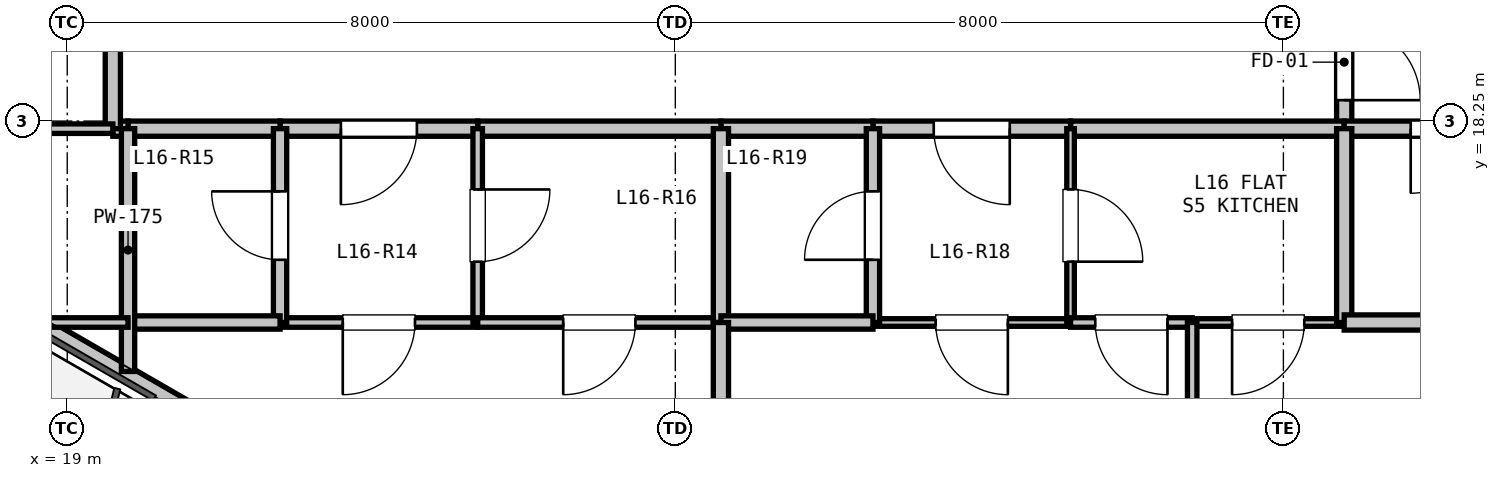
"""IFC4 building model, lengths in metres.
Left out: names, types, materials, properties, quantities, classifications, styles, units other than length and angle.
Written with IfcOpenShell. Run it as: python <this file> out.ifc"""

import sys

from ifc_helpers import new_model, si_unit, direction, frame, frame_2d, origin, place, context, subcontext, project, spatial, rectangle, extrude, element, fill, save


model = new_model("IFC4")
c1 = context("Model", 3, precision=1e-05, world=origin(), true_north=direction((0.0, 1.0)))
c2 = subcontext(c1, "Body", "Model", "MODEL_VIEW")
j1 = project(units=[si_unit("LENGTHUNIT", "METRE"), si_unit("PLANEANGLEUNIT", "RADIAN")], contexts=[c1])
p1 = place(None, origin())
s1 = spatial("IfcSite", under=j1, at=p1, CompositionType="ELEMENT")
p2 = place(p1, origin())
s2 = spatial("IfcBuilding", under=s1, at=p2, CompositionType="ELEMENT")
p3 = place(p2, frame((0.0, 0.0, 58.8)))
s3 = spatial("IfcBuildingStorey", under=s2, at=p3, CompositionType="ELEMENT", Elevation=58.8)
p4 = place(p3, frame((26.76, 10.896, 0.0), z_axis=(0.0, 0.0, 1.0), x_axis=(-0.866027351828, 0.499996625875, 0.0)))
e1 = element("IfcWall", 1, at=p4, inside=s3, PredefinedType="PARAPET", context=c2, shape_type="SweptSolid", body=[
    extrude(rectangle(XDim=11.973, YDim=0.2, at=frame_2d((5.987, 0.0))), origin(), (0.0, 0.0, 1.0), 0.2),
])
p5 = place(p3, frame((35.8, 19.9, 0.0), z_axis=(0.0, 0.0, 1.0), x_axis=(0.0, -1.0, 0.0)))
e2 = element("IfcWall", 2, at=p5, inside=s3, PredefinedType="PARTITIONING", context=c2, shape_type="SweptSolid", body=[
    extrude(rectangle(XDim=1.75, YDim=0.2, at=frame_2d((0.875, 0.0))), origin(), (0.0, 0.0, 1.0), 3.02),
])
p6 = place(p5, frame((0.375, 0.0, 0.0)))
e3 = element("IfcOpeningElement", 3, at=p6, cuts=e2, PredefinedType="OPENING", context=c2, shape_type="SweptSolid", body=[
    extrude(rectangle(XDim=1.0, YDim=2.15, at=frame_2d((0.5, 1.075))), frame((0.0, 0.11, 0.0), z_axis=(0.0, -1.0, 0.0), x_axis=(1.0, 0.0, 0.0)), (0.0, 0.0, 1.0), 0.22),
])
p7 = place(p3, frame((35.8, 18.15, 0.0), z_axis=(0.0, 0.0, 1.0), x_axis=(-1.0, 0.0, 0.0)))
e4 = element("IfcWall", 4, at=p7, inside=s3, PredefinedType="PARTITIONING", context=c2, shape_type="SweptSolid", body=[
    extrude(rectangle(XDim=3.6, YDim=0.2, at=frame_2d((1.8, 0.0))), origin(), (0.0, 0.0, 1.0), 3.02),
])
p8 = place(p3, frame((32.2, 18.15, 0.0), z_axis=(0.0, 0.0, 1.0), x_axis=(-1.0, 0.0, 0.0)))
e5 = element("IfcWall", 5, at=p8, inside=s3, PredefinedType="PARTITIONING", context=c2, shape_type="SweptSolid", body=[
    extrude(rectangle(XDim=2.6, YDim=0.2, at=frame_2d((1.3, 0.0))), origin(), (0.0, 0.0, 1.0), 3.02),
])
p9 = place(p8, frame((0.8, 0.0, 0.0)))
e6 = element("IfcOpeningElement", 6, at=p9, cuts=e5, PredefinedType="OPENING", context=c2, shape_type="SweptSolid", body=[
    extrude(rectangle(XDim=1.0, YDim=2.15, at=frame_2d((0.5, 1.075))), frame((0.0, 0.11, 0.0), z_axis=(0.0, -1.0, 0.0), x_axis=(1.0, 0.0, 0.0)), (0.0, 0.0, 1.0), 0.22),
])
p10 = place(p3, frame((29.6, 18.15, 0.0), z_axis=(0.0, 0.0, 1.0), x_axis=(-1.0, 0.0, 0.0)))
e7 = element("IfcWall", 7, at=p10, inside=s3, PredefinedType="PARTITIONING", context=c2, shape_type="SweptSolid", body=[
    extrude(rectangle(XDim=2.0, YDim=0.2, at=frame_2d((1.0, 0.0))), origin(), (0.0, 0.0, 1.0), 3.02),
])
p11 = place(p3, frame((27.6, 18.15, 0.0), z_axis=(0.0, 0.0, 1.0), x_axis=(-1.0, 0.0, 0.0)))
e8 = element("IfcWall", 8, at=p11, inside=s3, PredefinedType="PARTITIONING", context=c2, shape_type="SweptSolid", body=[
    extrude(rectangle(XDim=3.2, YDim=0.2, at=frame_2d((1.6, 0.0))), origin(), (0.0, 0.0, 1.0), 3.02),
])
p12 = place(p3, frame((24.4, 18.15, 0.0), z_axis=(0.0, 0.0, 1.0), x_axis=(-1.0, 0.0, 0.0)))
e9 = element("IfcWall", 9, at=p12, inside=s3, PredefinedType="PARTITIONING", context=c2, shape_type="SweptSolid", body=[
    extrude(rectangle(XDim=2.6, YDim=0.2, at=frame_2d((1.3, 0.0))), origin(), (0.0, 0.0, 1.0), 2.317),
])
p13 = place(p12, frame((0.8, 0.0, 0.0)))
e10 = element("IfcOpeningElement", 10, at=p13, cuts=e9, PredefinedType="OPENING", context=c2, shape_type="SweptSolid", body=[
    extrude(rectangle(XDim=1.0, YDim=2.15, at=frame_2d((0.5, 1.075))), frame((0.0, 0.11, 0.0), z_axis=(0.0, -1.0, 0.0), x_axis=(1.0, 0.0, 0.0)), (0.0, 0.0, 1.0), 0.22),
])
p14 = place(p3, frame((21.8, 18.15, 0.0), z_axis=(0.0, 0.0, 1.0), x_axis=(-1.0, 0.0, 0.0)))
e11 = element("IfcWall", 11, at=p14, inside=s3, PredefinedType="PARTITIONING", context=c2, shape_type="SweptSolid", body=[
    extrude(rectangle(XDim=2.0, YDim=0.2, at=frame_2d((1.0, 0.0))), origin(), (0.0, 0.0, 1.0), 3.02),
])
p15 = place(p3, frame((19.8, 18.15, 0.0), z_axis=(0.0, 0.0, 1.0), x_axis=(-1.0, 0.0, 0.0)))
e12 = element("IfcWall", 12, at=p15, inside=s3, PredefinedType="PARTITIONING", context=c2, shape_type="SweptSolid", body=[
    extrude(rectangle(XDim=0.2, YDim=0.2, at=frame_2d((0.1, 0.0))), origin(), (0.0, 0.0, 1.0), 3.02),
])
p16 = place(p3, frame((19.6, 18.15, 0.0), z_axis=(0.0, 0.0, 1.0), x_axis=(0.0, 1.0, 0.0)))
e13 = element("IfcWall", 13, at=p16, inside=s3, PredefinedType="PARTITIONING", context=c2, shape_type="SweptSolid", body=[
    extrude(rectangle(XDim=3.55, YDim=0.2, at=frame_2d((1.775, 0.0))), origin(), (0.0, 0.0, 1.0), 2.317),
])
p17 = place(p3, frame((38.4, 18.15, 0.0), z_axis=(0.0, 0.0, 1.0), x_axis=(-1.0, 0.0, 0.0)))
e14 = element("IfcWall", 14, at=p17, inside=s3, PredefinedType="PARTITIONING", context=c2, shape_type="SweptSolid", body=[
    extrude(rectangle(XDim=2.6, YDim=0.2, at=frame_2d((1.3, 0.0))), origin(), (0.0, 0.0, 1.0), 2.317),
])
p18 = place(p17, frame((0.875, 0.0, 0.0)))
e15 = element("IfcOpeningElement", 15, at=p18, cuts=e14, PredefinedType="OPENING", context=c2, shape_type="SweptSolid", body=[
    extrude(rectangle(XDim=0.85, YDim=2.1, at=frame_2d((0.425, 1.05))), frame((0.0, 0.11, 0.0), z_axis=(0.0, -1.0, 0.0), x_axis=(1.0, 0.0, 0.0)), (0.0, 0.0, 1.0), 0.22),
])
p19 = place(p3, frame((24.4, 15.6, 0.0), z_axis=(0.0, 0.0, 1.0), x_axis=(-1.0, 0.0, 0.0)))
e16 = element("IfcWall", 16, at=p19, inside=s3, PredefinedType="PARTITIONING", context=c2, shape_type="SweptSolid", body=[
    extrude(rectangle(XDim=2.6, YDim=0.125, at=frame_2d((1.3, 0.0))), origin(), (0.0, 0.0, 1.0), 3.02),
])
p20 = place(p19, frame((0.825, 0.0, 0.0)))
e17 = element("IfcOpeningElement", 17, at=p20, cuts=e16, PredefinedType="OPENING", context=c2, shape_type="SweptSolid", body=[
    extrude(rectangle(XDim=0.95, YDim=2.1, at=frame_2d((0.475, 1.05))), frame((0.0, 0.073, 0.0), z_axis=(0.0, -1.0, 0.0), x_axis=(1.0, 0.0, 0.0)), (0.0, 0.0, 1.0), 0.145),
])
p21 = place(p3, frame((21.8, 15.6, 0.0), z_axis=(0.0, 0.0, 1.0), x_axis=(0.0, 1.0, 0.0)))
e18 = element("IfcWall", 18, at=p21, inside=s3, PredefinedType="PLUMBINGWALL", context=c2, shape_type="SweptSolid", body=[
    extrude(rectangle(XDim=2.55, YDim=0.175, at=frame_2d((1.275, 0.0))), origin(), (0.0, 0.0, 1.0), 3.02),
])
p22 = place(p21, frame((0.825, 0.0, 0.0)))
e19 = element("IfcOpeningElement", 19, at=p22, cuts=e18, PredefinedType="OPENING", context=c2, shape_type="SweptSolid", body=[
    extrude(rectangle(XDim=0.9, YDim=2.1, at=frame_2d((0.45, 1.05))), frame((0.0, 0.097, 0.0), z_axis=(0.0, -1.0, 0.0), x_axis=(1.0, 0.0, 0.0)), (0.0, 0.0, 1.0), 0.195),
])
p23 = place(p3, frame((24.4, 18.15, 0.0), z_axis=(0.0, 0.0, 1.0), x_axis=(0.0, -1.0, 0.0)))
e20 = element("IfcWall", 20, at=p23, inside=s3, PredefinedType="PARTITIONING", context=c2, shape_type="SweptSolid", body=[
    extrude(rectangle(XDim=2.55, YDim=0.125, at=frame_2d((1.275, 0.0))), origin(), (0.0, 0.0, 1.0), 2.317),
])
p24 = place(p23, frame((0.8, 0.0, 0.0)))
e21 = element("IfcOpeningElement", 21, at=p24, cuts=e20, PredefinedType="OPENING", context=c2, shape_type="SweptSolid", body=[
    extrude(rectangle(XDim=0.95, YDim=2.1, at=frame_2d((0.475, 1.05))), frame((0.0, 0.073, 0.0), z_axis=(0.0, -1.0, 0.0), x_axis=(1.0, 0.0, 0.0)), (0.0, 0.0, 1.0), 0.145),
])
p25 = place(p3, frame((32.2, 15.6, 0.0), z_axis=(0.0, 0.0, 1.0), x_axis=(-1.0, 0.0, 0.0)))
e22 = element("IfcWall", 22, at=p25, inside=s3, PredefinedType="PARTITIONING", context=c2, shape_type="SweptSolid", body=[
    extrude(rectangle(XDim=2.6, YDim=0.1, at=frame_2d((1.3, 0.0))), origin(), (0.0, 0.0, 1.0), 3.02),
])
p26 = place(p25, frame((0.825, 0.0, 0.0)))
e23 = element("IfcOpeningElement", 23, at=p26, cuts=e22, PredefinedType="OPENING", context=c2, shape_type="SweptSolid", body=[
    extrude(rectangle(XDim=0.95, YDim=2.1, at=frame_2d((0.475, 1.05))), frame((0.0, 0.06, 0.0), z_axis=(0.0, -1.0, 0.0), x_axis=(1.0, 0.0, 0.0)), (0.0, 0.0, 1.0), 0.12),
])
p27 = place(p3, frame((29.6, 15.6, 0.0), z_axis=(0.0, 0.0, 1.0), x_axis=(0.0, 1.0, 0.0)))
e24 = element("IfcWall", 24, at=p27, inside=s3, PredefinedType="PLUMBINGWALL", context=c2, shape_type="SweptSolid", body=[
    extrude(rectangle(XDim=2.55, YDim=0.175, at=frame_2d((1.275, 0.0))), origin(), (0.0, 0.0, 1.0), 3.02),
])
p28 = place(p27, frame((0.825, 0.0, 0.0)))
e25 = element("IfcOpeningElement", 25, at=p28, cuts=e24, PredefinedType="OPENING", context=c2, shape_type="SweptSolid", body=[
    extrude(rectangle(XDim=0.9, YDim=2.1, at=frame_2d((0.45, 1.05))), frame((0.0, 0.097, 0.0), z_axis=(0.0, -1.0, 0.0), x_axis=(1.0, 0.0, 0.0)), (0.0, 0.0, 1.0), 0.195),
])
p29 = place(p3, frame((32.2, 18.15, 0.0), z_axis=(0.0, 0.0, 1.0), x_axis=(0.0, -1.0, 0.0)))
e26 = element("IfcWall", 26, at=p29, inside=s3, PredefinedType="PARTITIONING", context=c2, shape_type="SweptSolid", body=[
    extrude(rectangle(XDim=2.55, YDim=0.1, at=frame_2d((1.275, 0.0))), origin(), (0.0, 0.0, 1.0), 3.02),
])
p30 = place(p29, frame((0.8, 0.0, 0.0)))
e27 = element("IfcOpeningElement", 27, at=p30, cuts=e26, PredefinedType="OPENING", context=c2, shape_type="SweptSolid", body=[
    extrude(rectangle(XDim=0.95, YDim=2.1, at=frame_2d((0.475, 1.05))), frame((0.0, 0.06, 0.0), z_axis=(0.0, -1.0, 0.0), x_axis=(1.0, 0.0, 0.0)), (0.0, 0.0, 1.0), 0.12),
])
p31 = place(p3, frame((21.8, 15.6, 0.0), z_axis=(0.0, 0.0, 1.0), x_axis=(-1.0, 0.0, 0.0)))
e28 = element("IfcWall", 28, at=p31, inside=s3, PredefinedType="PLUMBINGWALL", context=c2, shape_type="SweptSolid", body=[
    extrude(rectangle(XDim=2.0, YDim=0.175, at=frame_2d((1.0, 0.0))), origin(), (0.0, 0.0, 1.0), 2.365),
])
p32 = place(p3, frame((19.8, 14.956, 0.0), z_axis=(0.0, 0.0, 1.0), x_axis=(0.0, 1.0, 0.0)))
e29 = element("IfcWall", 29, at=p32, inside=s3, PredefinedType="PLUMBINGWALL", context=c2, shape_type="SweptSolid", body=[
    extrude(rectangle(XDim=3.194, YDim=0.175, at=frame_2d((1.597, 0.0))), origin(), (0.0, 0.0, 1.0), 2.365),
])
p33 = place(p3, frame((27.6, 15.6, 0.0), z_axis=(0.0, 0.0, 1.0), x_axis=(-1.0, 0.0, 0.0)))
e30 = element("IfcWall", 30, at=p33, inside=s3, PredefinedType="PARTITIONING", context=c2, shape_type="SweptSolid", body=[
    extrude(rectangle(XDim=3.2, YDim=0.125, at=frame_2d((1.6, 0.0))), origin(), (0.0, 0.0, 1.0), 2.317),
])
p34 = place(p33, frame((1.125, 0.0, 0.0)))
e31 = element("IfcOpeningElement", 31, at=p34, cuts=e30, PredefinedType="OPENING", context=c2, shape_type="SweptSolid", body=[
    extrude(rectangle(XDim=0.95, YDim=2.1, at=frame_2d((0.475, 1.05))), frame((0.0, 0.073, 0.0), z_axis=(0.0, -1.0, 0.0), x_axis=(1.0, 0.0, 0.0)), (0.0, 0.0, 1.0), 0.145),
])
p35 = place(p3, frame((27.6, 18.15, 0.0), z_axis=(0.0, 0.0, 1.0), x_axis=(0.0, -1.0, 0.0)))
e32 = element("IfcWall", 32, at=p35, inside=s3, PredefinedType="PARTITIONING", context=c2, shape_type="SweptSolid", body=[
    extrude(rectangle(XDim=2.55, YDim=0.2, at=frame_2d((1.275, 0.0))), origin(), (0.0, 0.0, 1.0), 3.02),
])
p36 = place(p3, frame((29.6, 15.6, 0.0), z_axis=(0.0, 0.0, 1.0), x_axis=(-1.0, 0.0, 0.0)))
e33 = element("IfcWall", 33, at=p36, inside=s3, PredefinedType="PLUMBINGWALL", context=c2, shape_type="SweptSolid", body=[
    extrude(rectangle(XDim=2.0, YDim=0.175, at=frame_2d((1.0, 0.0))), origin(), (0.0, 0.0, 1.0), 3.02),
])
p37 = place(p3, frame((35.8, 15.6, 0.0), z_axis=(0.0, 0.0, 1.0), x_axis=(-1.0, 0.0, 0.0)))
e34 = element("IfcWall", 34, at=p37, inside=s3, PredefinedType="PARTITIONING", context=c2, shape_type="SweptSolid", body=[
    extrude(rectangle(XDim=2.0, YDim=0.1, at=frame_2d((1.0, 0.0))), origin(), (0.0, 0.0, 1.0), 3.02),
])
p38 = place(p37, frame((0.525, 0.0, 0.0)))
e35 = element("IfcOpeningElement", 35, at=p38, cuts=e34, PredefinedType="OPENING", context=c2, shape_type="SweptSolid", body=[
    extrude(rectangle(XDim=0.95, YDim=2.1, at=frame_2d((0.475, 1.05))), frame((0.0, 0.06, 0.0), z_axis=(0.0, -1.0, 0.0), x_axis=(1.0, 0.0, 0.0)), (0.0, 0.0, 1.0), 0.12),
])
p39 = place(p3, frame((33.8, 15.6, 0.0), z_axis=(0.0, 0.0, 1.0), x_axis=(-1.0, 0.0, 0.0)))
e36 = element("IfcWall", 36, at=p39, inside=s3, PredefinedType="PARTITIONING", context=c2, shape_type="SweptSolid", body=[
    extrude(rectangle(XDim=1.6, YDim=0.125, at=frame_2d((0.8, 0.0))), origin(), (0.0, 0.0, 1.0), 3.02),
])
p40 = place(p39, frame((0.325, 0.0, 0.0)))
e37 = element("IfcOpeningElement", 37, at=p40, cuts=e36, PredefinedType="OPENING", context=c2, shape_type="SweptSolid", body=[
    extrude(rectangle(XDim=0.95, YDim=2.1, at=frame_2d((0.475, 1.05))), frame((0.0, 0.073, 0.0), z_axis=(0.0, -1.0, 0.0), x_axis=(1.0, 0.0, 0.0)), (0.0, 0.0, 1.0), 0.145),
])
p41 = place(p3, frame((35.8, 18.15, 0.0), z_axis=(0.0, 0.0, 1.0), x_axis=(0.0, -1.0, 0.0)))
e38 = element("IfcWall", 38, at=p41, inside=s3, PredefinedType="PARTITIONING", context=c2, shape_type="SweptSolid", body=[
    extrude(rectangle(XDim=2.55, YDim=0.2, at=frame_2d((1.275, 0.0))), origin(), (0.0, 0.0, 1.0), 3.02),
])
p42 = place(p3, frame((19.6, 18.15, 0.0), z_axis=(0.0, 0.0, 1.0), x_axis=(-1.0, 0.0, 0.0)))
e39 = element("IfcWall", 39, at=p42, inside=s3, PredefinedType="PARTITIONING", context=c2, shape_type="SweptSolid", body=[
    extrude(rectangle(XDim=2.45, YDim=0.125, at=frame_2d((1.225, 0.0))), origin(), (0.0, 0.0, 1.0), 3.02),
])
p43 = place(p3, frame((43.688, 15.6, 0.0), z_axis=(0.0, 0.0, 1.0), x_axis=(-1.0, 0.0, 0.0)))
e40 = element("IfcWall", 40, at=p43, inside=s3, PredefinedType="PARTITIONING", context=c2, shape_type="SweptSolid", body=[
    extrude(rectangle(XDim=7.888, YDim=0.2, at=frame_2d((3.944, 0.0))), origin(), (0.0, 0.0, 1.0), 2.317),
])
p44 = place(p3, frame((18.678, 15.6, 0.0), z_axis=(0.0, 0.0, 1.0), x_axis=(1.0, 0.0, 0.0)))
e41 = element("IfcWall", 41, at=p44, inside=s3, PredefinedType="PARTITIONING", context=c2, shape_type="SweptSolid", body=[
    extrude(rectangle(XDim=1.122, YDim=0.125, at=frame_2d((0.561, 0.0))), origin(), (0.0, 0.0, 1.0), 2.365),
])
p45 = place(p3, frame((27.6, 15.6, 0.0), z_axis=(0.0, 0.0, 1.0), x_axis=(0.0, -1.0, 0.0)))
e42 = element("IfcWall", 42, at=p45, inside=s3, PredefinedType="PARTITIONING", context=c2, shape_type="SweptSolid", body=[
    extrude(rectangle(XDim=4.838, YDim=0.2, at=frame_2d((2.419, 0.0))), origin(), (0.0, 0.0, 1.0), 2.317),
])
p46 = place(p3, frame((33.8, 15.6, 0.0), z_axis=(0.0, 0.0, 1.0), x_axis=(0.0, -1.0, 0.0)))
e43 = element("IfcWall", 43, at=p46, inside=s3, PredefinedType="PARTITIONING", context=c2, shape_type="SweptSolid", body=[
    extrude(rectangle(XDim=5.98, YDim=0.125, at=frame_2d((2.99, 0.0))), origin(), (0.0, 0.0, 1.0), 3.02),
])
p47 = place(p46, frame((2.515, 0.0, 0.0)))
e44 = element("IfcOpeningElement", 44, at=p47, cuts=e43, PredefinedType="OPENING", context=c2, shape_type="SweptSolid", body=[
    extrude(rectangle(XDim=0.95, YDim=2.1, at=frame_2d((0.475, 1.05))), frame((0.0, 0.073, 0.0), z_axis=(0.0, -1.0, 0.0), x_axis=(1.0, 0.0, 0.0)), (0.0, 0.0, 1.0), 0.145),
])
p48 = place(p6, origin())
e45 = element("IfcDoor", 45, at=p48, inside=s3, OperationType="SINGLE_SWING_RIGHT", PredefinedType="DOOR", context=c2, shape_type="SweptSolid", body=[
    extrude(rectangle(XDim=1.0, YDim=2.15, at=frame_2d((0.5, 1.075))), frame((0.0, 0.025, 0.0), z_axis=(0.0, -1.0, 0.0), x_axis=(1.0, 0.0, 0.0)), (0.0, 0.0, 1.0), 0.05),
])
fill(e3, e45)
p49 = place(p13, origin())
e46 = element("IfcDoor", 46, at=p49, inside=s3, OperationType="SINGLE_SWING_RIGHT", PredefinedType="DOOR", context=c2, shape_type="SweptSolid", body=[
    extrude(rectangle(XDim=1.0, YDim=2.15, at=frame_2d((0.5, 1.075))), frame((0.0, 0.025, 0.0), z_axis=(0.0, -1.0, 0.0), x_axis=(1.0, 0.0, 0.0)), (0.0, 0.0, 1.0), 0.05),
])
fill(e10, e46)
p50 = place(p9, origin())
e47 = element("IfcDoor", 47, at=p50, inside=s3, OperationType="SINGLE_SWING_LEFT", PredefinedType="DOOR", context=c2, shape_type="SweptSolid", body=[
    extrude(rectangle(XDim=1.0, YDim=2.15, at=frame_2d((0.5, 1.075))), frame((0.0, 0.025, 0.0), z_axis=(0.0, -1.0, 0.0), x_axis=(1.0, 0.0, 0.0)), (0.0, 0.0, 1.0), 0.05),
])
fill(e6, e47)
p51 = place(p18, origin())
e48 = element("IfcDoor", 48, at=p51, inside=s3, OperationType="SINGLE_SWING_RIGHT", PredefinedType="DOOR", context=c2, shape_type="SweptSolid", body=[
    extrude(rectangle(XDim=0.85, YDim=2.1, at=frame_2d((0.425, 1.05))), frame((0.0, 0.025, 0.0), z_axis=(0.0, -1.0, 0.0), x_axis=(1.0, 0.0, 0.0)), (0.0, 0.0, 1.0), 0.05),
])
fill(e15, e48)
p52 = place(p22, origin())
e49 = element("IfcDoor", 49, at=p52, inside=s3, OperationType="SINGLE_SWING_RIGHT", PredefinedType="DOOR", context=c2, shape_type="SweptSolid", body=[
    extrude(rectangle(XDim=0.9, YDim=2.1, at=frame_2d((0.45, 1.05))), frame((0.0, 0.025, 0.0), z_axis=(0.0, -1.0, 0.0), x_axis=(1.0, 0.0, 0.0)), (0.0, 0.0, 1.0), 0.05),
])
fill(e19, e49)
p53 = place(p24, origin())
e50 = element("IfcDoor", 50, at=p53, inside=s3, OperationType="SINGLE_SWING_LEFT", PredefinedType="DOOR", context=c2, shape_type="SweptSolid", body=[
    extrude(rectangle(XDim=0.95, YDim=2.1, at=frame_2d((0.475, 1.05))), frame((0.0, 0.025, 0.0), z_axis=(0.0, -1.0, 0.0), x_axis=(1.0, 0.0, 0.0)), (0.0, 0.0, 1.0), 0.05),
])
fill(e21, e50)
p54 = place(p20, origin())
e51 = element("IfcDoor", 51, at=p54, inside=s3, OperationType="SINGLE_SWING_RIGHT", PredefinedType="DOOR", context=c2, shape_type="SweptSolid", body=[
    extrude(rectangle(XDim=0.95, YDim=2.1, at=frame_2d((0.475, 1.05))), frame((0.0, 0.025, 0.0), z_axis=(0.0, -1.0, 0.0), x_axis=(1.0, 0.0, 0.0)), (0.0, 0.0, 1.0), 0.05),
])
fill(e17, e51)
p55 = place(p28, origin())
e52 = element("IfcDoor", 52, at=p55, inside=s3, OperationType="SINGLE_SWING_LEFT", PredefinedType="DOOR", context=c2, shape_type="SweptSolid", body=[
    extrude(rectangle(XDim=0.9, YDim=2.1, at=frame_2d((0.45, 1.05))), frame((0.0, 0.025, 0.0), z_axis=(0.0, -1.0, 0.0), x_axis=(1.0, 0.0, 0.0)), (0.0, 0.0, 1.0), 0.05),
])
fill(e25, e52)
p56 = place(p30, origin())
e53 = element("IfcDoor", 53, at=p56, inside=s3, OperationType="SINGLE_SWING_RIGHT", PredefinedType="DOOR", context=c2, shape_type="SweptSolid", body=[
    extrude(rectangle(XDim=0.95, YDim=2.1, at=frame_2d((0.475, 1.05))), frame((0.0, 0.025, 0.0), z_axis=(0.0, -1.0, 0.0), x_axis=(1.0, 0.0, 0.0)), (0.0, 0.0, 1.0), 0.05),
])
fill(e27, e53)
p57 = place(p26, origin())
e54 = element("IfcDoor", 54, at=p57, inside=s3, OperationType="SINGLE_SWING_LEFT", PredefinedType="DOOR", context=c2, shape_type="SweptSolid", body=[
    extrude(rectangle(XDim=0.95, YDim=2.1, at=frame_2d((0.475, 1.05))), frame((0.0, 0.025, 0.0), z_axis=(0.0, -1.0, 0.0), x_axis=(1.0, 0.0, 0.0)), (0.0, 0.0, 1.0), 0.05),
])
fill(e23, e54)
p58 = place(p34, origin())
e55 = element("IfcDoor", 55, at=p58, inside=s3, OperationType="SINGLE_SWING_RIGHT", PredefinedType="DOOR", context=c2, shape_type="SweptSolid", body=[
    extrude(rectangle(XDim=0.95, YDim=2.1, at=frame_2d((0.475, 1.05))), frame((0.0, 0.025, 0.0), z_axis=(0.0, -1.0, 0.0), x_axis=(1.0, 0.0, 0.0)), (0.0, 0.0, 1.0), 0.05),
])
fill(e31, e55)
p59 = place(p40, origin())
e56 = element("IfcDoor", 56, at=p59, inside=s3, OperationType="SINGLE_SWING_LEFT", PredefinedType="DOOR", context=c2, shape_type="SweptSolid", body=[
    extrude(rectangle(XDim=0.95, YDim=2.1, at=frame_2d((0.475, 1.05))), frame((0.0, 0.025, 0.0), z_axis=(0.0, -1.0, 0.0), x_axis=(1.0, 0.0, 0.0)), (0.0, 0.0, 1.0), 0.05),
])
fill(e37, e56)
p60 = place(p38, origin())
e57 = element("IfcDoor", 57, at=p60, inside=s3, OperationType="SINGLE_SWING_RIGHT", PredefinedType="DOOR", context=c2, shape_type="SweptSolid", body=[
    extrude(rectangle(XDim=0.95, YDim=2.1, at=frame_2d((0.475, 1.05))), frame((0.0, 0.025, 0.0), z_axis=(0.0, -1.0, 0.0), x_axis=(1.0, 0.0, 0.0)), (0.0, 0.0, 1.0), 0.05),
])
fill(e35, e57)
save(model, sys.argv[1])
